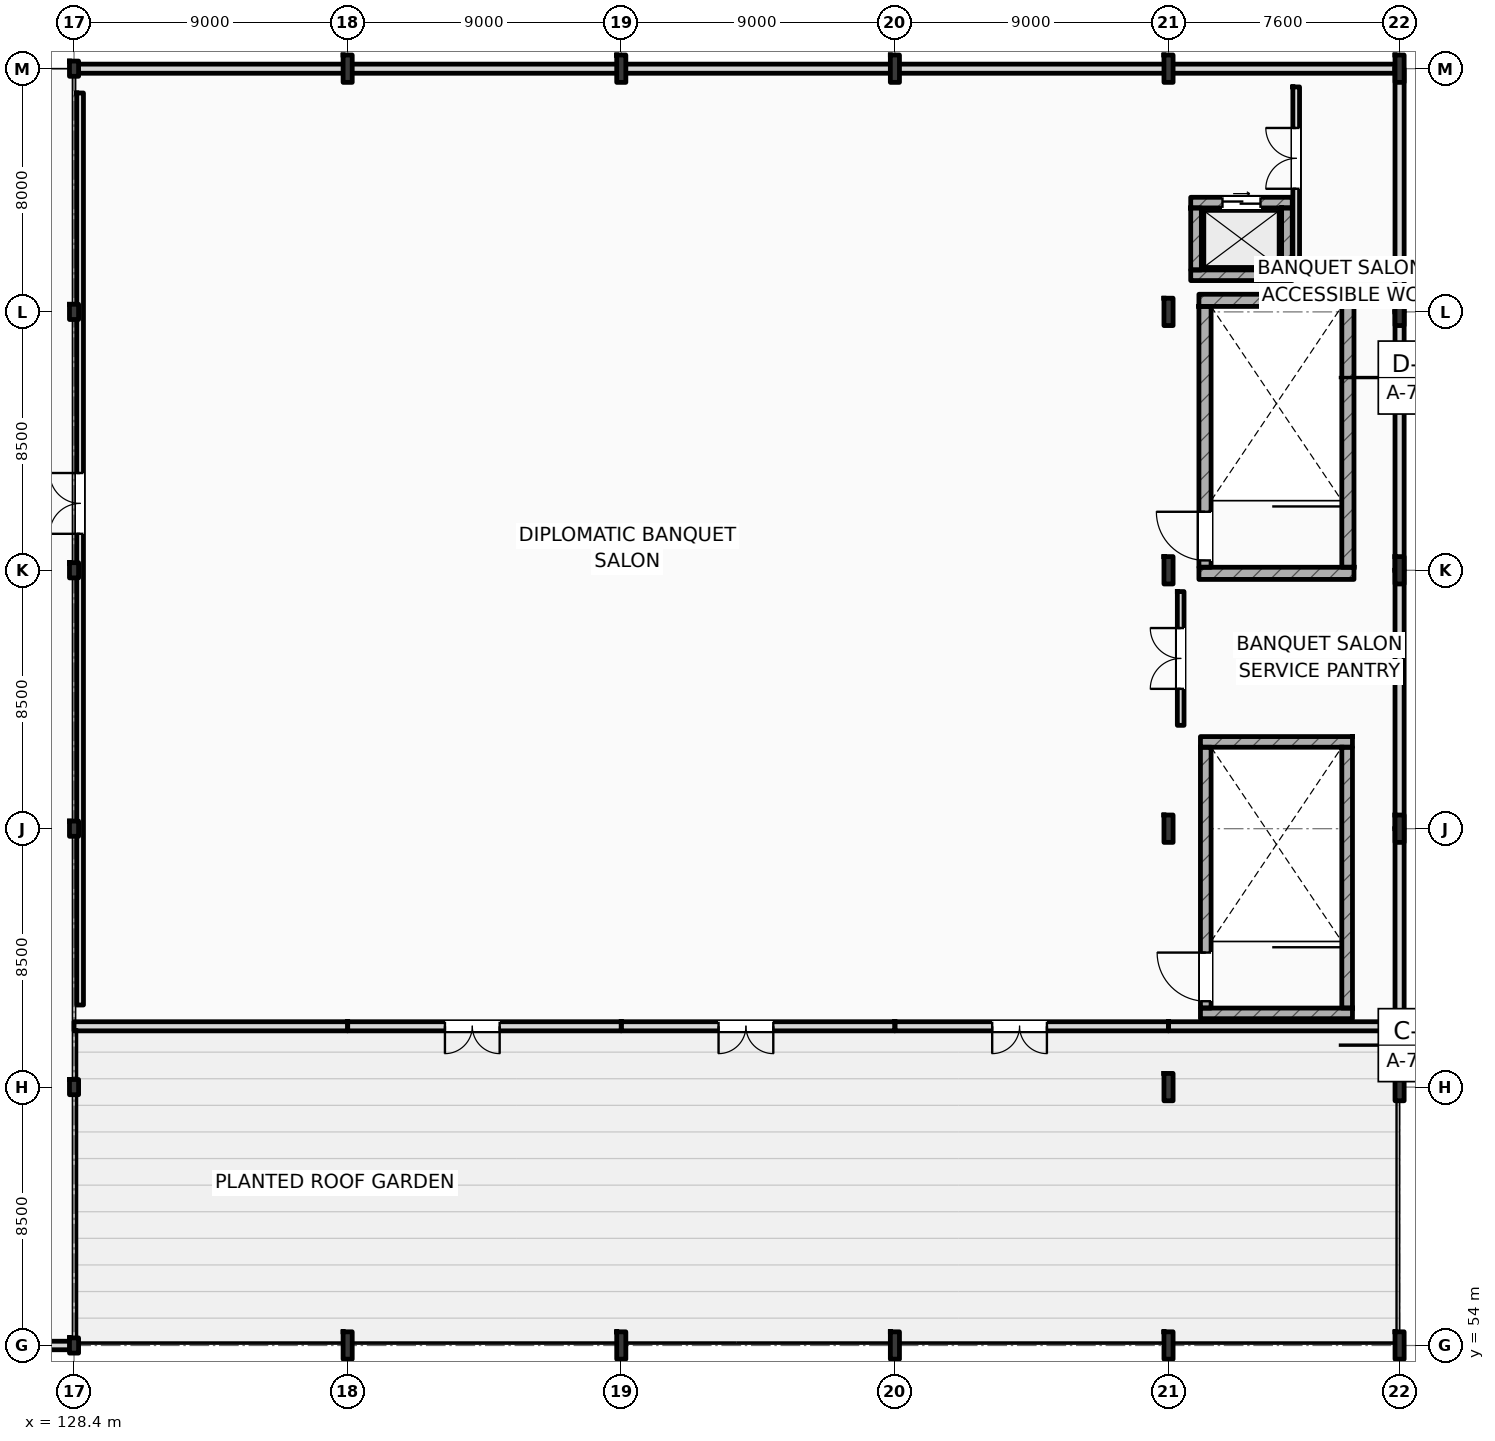
"""IFC4 building model, lengths in metres.
Left out: names, types, materials, properties, quantities, classifications, styles, units other than length and angle.
Written with IfcOpenShell. Run it as: python <this file> out.ifc"""

import sys

from ifc_helpers import new_model, si_unit, direction, frame, frame_2d, origin, origin_2d, place, context, subcontext, project, spatial, rectangle, i_section, extrude, element, fill, save


model = new_model("IFC4")
c1 = context("Model", 3, precision=1e-05, world=origin(), true_north=direction((0.0, 1.0)))
c2 = subcontext(c1, "Body", "Model", "MODEL_VIEW")
j1 = project(units=[si_unit("LENGTHUNIT", "METRE"), si_unit("PLANEANGLEUNIT", "RADIAN")], contexts=[c1])
p1 = place(None, origin())
s1 = spatial("IfcSite", under=j1, at=p1, CompositionType="ELEMENT")
p2 = place(p1, origin())
s2 = spatial("IfcBuilding", under=s1, at=p2, CompositionType="ELEMENT")
p3 = place(p2, frame((0.0, 0.0, 11.4)))
s3 = spatial("IfcBuildingStorey", under=s2, at=p3, CompositionType="ELEMENT", Elevation=11.4)
for number, where, z_axis, x_axis in (
    (1, (128.4, 54.0, 0.0), (0.0, 0.0, 1.0), (1.0, 0.0, 0.0)),
    (2, (128.4, 62.5, 0.0), (0.0, 0.0, 1.0), (1.0, 0.0, 0.0)),
    (3, (128.4, 71.0, 0.0), (0.0, 0.0, 1.0), (1.0, 0.0, 0.0)),
    (4, (128.4, 79.5, 0.0), (0.0, 0.0, 1.0), (1.0, 0.0, 0.0)),
    (5, (128.4, 88.0, 0.0), (0.0, 0.0, 1.0), (1.0, 0.0, 0.0)),
    (6, (128.4, 96.0, 0.0), (0.0, 0.0, 1.0), (1.0, 0.0, 0.0)),
):
    element("IfcColumn", number, at=place(p3, frame(where, z_axis=z_axis, x_axis=x_axis)), inside=s3, PredefinedType="COLUMN", context=c2, shape_type="SweptSolid", body=[
        extrude(i_section(OverallWidth=0.3, OverallDepth=0.5, WebThickness=0.014, FlangeThickness=0.028, FilletRadius=0.027, at=origin_2d()), origin(), (0.0, 0.0, 1.0), 4.8),
    ])
for number, where, z_axis, x_axis in (
    (7, (164.4, 54.0, 0.0), (0.0, 0.0, 1.0), (1.0, 0.0, 0.0)),
    (8, (164.4, 62.5, 0.0), (0.0, 0.0, 1.0), (1.0, 0.0, 0.0)),
    (9, (164.4, 71.0, 0.0), (0.0, 0.0, 1.0), (1.0, 0.0, 0.0)),
    (10, (164.4, 79.5, 0.0), (0.0, 0.0, 1.0), (1.0, 0.0, 0.0)),
    (11, (164.4, 88.0, 0.0), (0.0, 0.0, 1.0), (1.0, 0.0, 0.0)),
    (12, (164.4, 96.0, 0.0), (0.0, 0.0, 1.0), (1.0, 0.0, 0.0)),
    (13, (172.0, 54.0, 0.0), (0.0, 0.0, 1.0), (1.0, 0.0, 0.0)),
    (14, (172.0, 62.5, 0.0), (0.0, 0.0, 1.0), (1.0, 0.0, 0.0)),
    (15, (172.0, 71.0, 0.0), (0.0, 0.0, 1.0), (1.0, 0.0, 0.0)),
    (16, (172.0, 79.5, 0.0), (0.0, 0.0, 1.0), (1.0, 0.0, 0.0)),
    (17, (172.0, 88.0, 0.0), (0.0, 0.0, 1.0), (1.0, 0.0, 0.0)),
    (18, (172.0, 96.0, 0.0), (0.0, 0.0, 1.0), (1.0, 0.0, 0.0)),
    (19, (137.4, 54.0, 0.0), (0.0, 0.0, 1.0), (1.0, 0.0, 0.0)),
    (20, (137.4, 96.0, 0.0), (0.0, 0.0, 1.0), (1.0, 0.0, 0.0)),
    (21, (146.4, 54.0, 0.0), (0.0, 0.0, 1.0), (1.0, 0.0, 0.0)),
    (22, (146.4, 96.0, 0.0), (0.0, 0.0, 1.0), (1.0, 0.0, 0.0)),
    (23, (155.4, 54.0, 0.0), (0.0, 0.0, 1.0), (1.0, 0.0, 0.0)),
    (24, (155.4, 96.0, 0.0), (0.0, 0.0, 1.0), (1.0, 0.0, 0.0)),
):
    element("IfcColumn", number, at=place(p3, frame(where, z_axis=z_axis, x_axis=x_axis)), inside=s3, PredefinedType="COLUMN", context=c2, shape_type="SweptSolid", body=[
        extrude(i_section(OverallWidth=0.3, OverallDepth=0.9, WebThickness=0.019, FlangeThickness=0.035, FilletRadius=0.03, at=origin_2d()), origin(), (0.0, 0.0, 1.0), 4.8),
    ])
for number, where, z_axis, x_axis in (
    (25, (165.4, 88.38, 0.0), (0.0, 0.0, 1.0), (1.0, 0.0, 0.0)),
    (26, (165.4, 79.4, 0.0), (0.0, 0.0, 1.0), (1.0, 0.0, 0.0)),
):
    element("IfcWall", number, at=place(p3, frame(where, z_axis=z_axis, x_axis=x_axis)), inside=s3, PredefinedType="SHEAR", context=c2, shape_type="SweptSolid", body=[
        extrude(rectangle(XDim=5.1, YDim=0.4, at=frame_2d((2.55, 0.0))), origin(), (0.0, 0.0, 1.0), 4.8),
    ])
p4 = place(p3, frame((165.6, 79.6, 0.0), z_axis=(0.0, 0.0, 1.0), x_axis=(0.0, 1.0, 0.0)))
e27 = element("IfcWall", 27, at=p4, inside=s3, PredefinedType="SHEAR", context=c2, shape_type="SweptSolid", body=[
    extrude(rectangle(XDim=8.58, YDim=0.4, at=frame_2d((4.29, 0.0))), origin(), (0.0, 0.0, 1.0), 4.8),
])
p5 = place(p4, frame((0.225, 0.0, 0.0)))
e28 = element("IfcOpeningElement", 28, at=p5, cuts=e27, PredefinedType="OPENING", context=c2, shape_type="SweptSolid", body=[
    extrude(rectangle(XDim=1.6, YDim=2.2, at=frame_2d((0.8, 1.1))), frame((0.0, 0.21, 0.0), z_axis=(0.0, -1.0, 0.0), x_axis=(1.0, 0.0, 0.0)), (0.0, 0.0, 1.0), 0.42),
])
p6 = place(p3, frame((170.3, 79.6, 0.0), z_axis=(0.0, 0.0, 1.0), x_axis=(0.0, 1.0, 0.0)))
e29 = element("IfcWall", 29, at=p6, inside=s3, PredefinedType="SHEAR", context=c2, shape_type="SweptSolid", body=[
    extrude(rectangle(XDim=8.58, YDim=0.4, at=frame_2d((4.29, 0.0))), origin(), (0.0, 0.0, 1.0), 4.8),
])
for number, where, z_axis, x_axis in (
    (30, (165.45, 73.855, 0.0), (0.0, 0.0, 1.0), (1.0, 0.0, 0.0)),
    (31, (165.45, 64.925, 0.0), (0.0, 0.0, 1.0), (1.0, 0.0, 0.0)),
):
    element("IfcWall", number, at=place(p3, frame(where, z_axis=z_axis, x_axis=x_axis)), inside=s3, PredefinedType="SHEAR", context=c2, shape_type="SweptSolid", body=[
        extrude(rectangle(XDim=5.0, YDim=0.35, at=frame_2d((2.5, 0.0))), origin(), (0.0, 0.0, 1.0), 4.8),
    ])
p7 = place(p3, frame((165.625, 65.1, 0.0), z_axis=(0.0, 0.0, 1.0), x_axis=(0.0, 1.0, 0.0)))
e32 = element("IfcWall", 32, at=p7, inside=s3, PredefinedType="SHEAR", context=c2, shape_type="SweptSolid", body=[
    extrude(rectangle(XDim=8.58, YDim=0.35, at=frame_2d((4.29, 0.0))), origin(), (0.0, 0.0, 1.0), 4.8),
])
p8 = place(p7, frame((0.225, 0.0, 0.0)))
e33 = element("IfcOpeningElement", 33, at=p8, cuts=e32, PredefinedType="OPENING", context=c2, shape_type="SweptSolid", body=[
    extrude(rectangle(XDim=1.6, YDim=2.2, at=frame_2d((0.8, 1.1))), frame((0.0, 0.185, 0.0), z_axis=(0.0, -1.0, 0.0), x_axis=(1.0, 0.0, 0.0)), (0.0, 0.0, 1.0), 0.37),
])
p9 = place(p3, frame((170.275, 65.1, 0.0), z_axis=(0.0, 0.0, 1.0), x_axis=(0.0, 1.0, 0.0)))
e34 = element("IfcWall", 34, at=p9, inside=s3, PredefinedType="SHEAR", context=c2, shape_type="SweptSolid", body=[
    extrude(rectangle(XDim=8.58, YDim=0.35, at=frame_2d((4.29, 0.0))), origin(), (0.0, 0.0, 1.0), 4.8),
])
p10 = place(p3, frame((103.2, 54.0, 0.0), z_axis=(0.0, 0.0, 1.0), x_axis=(1.0, 0.0, 0.0)))
e35 = element("IfcWall", 35, at=p10, inside=s3, PredefinedType="STANDARD", context=c2, shape_type="SweptSolid", body=[
    extrude(rectangle(XDim=25.2, YDim=0.28, at=frame_2d((12.6, 0.0))), origin(), (0.0, 0.0, 1.0), 3.96),
])
p11 = place(p3, frame((128.4, 64.5, 0.0), z_axis=(0.0, 0.0, 1.0), x_axis=(1.0, 0.0, 0.0)))
e36 = element("IfcWall", 36, at=p11, inside=s3, PredefinedType="STANDARD", context=c2, shape_type="SweptSolid", body=[
    extrude(rectangle(XDim=9.0, YDim=0.3, at=frame_2d((4.5, 0.0))), origin(), (0.0, 0.0, 1.0), 4.54),
])
p12 = place(p3, frame((128.4, 96.0, 0.0), z_axis=(0.0, 0.0, 1.0), x_axis=(1.0, 0.0, 0.0)))
e37 = element("IfcWall", 37, at=p12, inside=s3, PredefinedType="STANDARD", context=c2, shape_type="SweptSolid", body=[
    extrude(rectangle(XDim=9.0, YDim=0.3, at=frame_2d((4.5, 0.0))), origin(), (0.0, 0.0, 1.0), 4.05),
])
p13 = place(p3, frame((137.4, 64.5, 0.0), z_axis=(0.0, 0.0, 1.0), x_axis=(1.0, 0.0, 0.0)))
e38 = element("IfcWall", 38, at=p13, inside=s3, PredefinedType="STANDARD", context=c2, shape_type="SweptSolid", body=[
    extrude(rectangle(XDim=9.0, YDim=0.3, at=frame_2d((4.5, 0.0))), origin(), (0.0, 0.0, 1.0), 4.54),
])
p14 = place(p13, frame((3.2, 0.0, 0.0)))
e39 = element("IfcOpeningElement", 39, at=p14, cuts=e38, PredefinedType="OPENING", context=c2, shape_type="SweptSolid", body=[
    extrude(rectangle(XDim=1.8, YDim=2.4, at=frame_2d((0.9, 1.2))), frame((0.0, 0.16, 0.0), z_axis=(0.0, -1.0, 0.0), x_axis=(1.0, 0.0, 0.0)), (0.0, 0.0, 1.0), 0.32),
])
p15 = place(p3, frame((137.4, 96.0, 0.0), z_axis=(0.0, 0.0, 1.0), x_axis=(1.0, 0.0, 0.0)))
e40 = element("IfcWall", 40, at=p15, inside=s3, PredefinedType="STANDARD", context=c2, shape_type="SweptSolid", body=[
    extrude(rectangle(XDim=9.0, YDim=0.3, at=frame_2d((4.5, 0.0))), origin(), (0.0, 0.0, 1.0), 4.05),
])
p16 = place(p3, frame((146.4, 64.5, 0.0), z_axis=(0.0, 0.0, 1.0), x_axis=(1.0, 0.0, 0.0)))
e41 = element("IfcWall", 41, at=p16, inside=s3, PredefinedType="STANDARD", context=c2, shape_type="SweptSolid", body=[
    extrude(rectangle(XDim=9.0, YDim=0.3, at=frame_2d((4.5, 0.0))), origin(), (0.0, 0.0, 1.0), 4.54),
])
p17 = place(p16, frame((3.2, 0.0, 0.0)))
e42 = element("IfcOpeningElement", 42, at=p17, cuts=e41, PredefinedType="OPENING", context=c2, shape_type="SweptSolid", body=[
    extrude(rectangle(XDim=1.8, YDim=2.4, at=frame_2d((0.9, 1.2))), frame((0.0, 0.16, 0.0), z_axis=(0.0, -1.0, 0.0), x_axis=(1.0, 0.0, 0.0)), (0.0, 0.0, 1.0), 0.32),
])
p18 = place(p3, frame((146.4, 96.0, 0.0), z_axis=(0.0, 0.0, 1.0), x_axis=(1.0, 0.0, 0.0)))
e43 = element("IfcWall", 43, at=p18, inside=s3, PredefinedType="STANDARD", context=c2, shape_type="SweptSolid", body=[
    extrude(rectangle(XDim=9.0, YDim=0.3, at=frame_2d((4.5, 0.0))), origin(), (0.0, 0.0, 1.0), 4.05),
])
p19 = place(p3, frame((155.4, 64.5, 0.0), z_axis=(0.0, 0.0, 1.0), x_axis=(1.0, 0.0, 0.0)))
e44 = element("IfcWall", 44, at=p19, inside=s3, PredefinedType="STANDARD", context=c2, shape_type="SweptSolid", body=[
    extrude(rectangle(XDim=9.0, YDim=0.3, at=frame_2d((4.5, 0.0))), origin(), (0.0, 0.0, 1.0), 4.54),
])
p20 = place(p19, frame((3.2, 0.0, 0.0)))
e45 = element("IfcOpeningElement", 45, at=p20, cuts=e44, PredefinedType="OPENING", context=c2, shape_type="SweptSolid", body=[
    extrude(rectangle(XDim=1.8, YDim=2.4, at=frame_2d((0.9, 1.2))), frame((0.0, 0.16, 0.0), z_axis=(0.0, -1.0, 0.0), x_axis=(1.0, 0.0, 0.0)), (0.0, 0.0, 1.0), 0.32),
])
p21 = place(p3, frame((155.4, 96.0, 0.0), z_axis=(0.0, 0.0, 1.0), x_axis=(1.0, 0.0, 0.0)))
e46 = element("IfcWall", 46, at=p21, inside=s3, PredefinedType="STANDARD", context=c2, shape_type="SweptSolid", body=[
    extrude(rectangle(XDim=9.0, YDim=0.3, at=frame_2d((4.5, 0.0))), origin(), (0.0, 0.0, 1.0), 4.05),
])
p22 = place(p3, frame((164.4, 64.5, 0.0), z_axis=(0.0, 0.0, 1.0), x_axis=(1.0, 0.0, 0.0)))
e47 = element("IfcWall", 47, at=p22, inside=s3, PredefinedType="STANDARD", context=c2, shape_type="SweptSolid", body=[
    extrude(rectangle(XDim=7.6, YDim=0.3, at=frame_2d((3.8, 0.0))), origin(), (0.0, 0.0, 1.0), 4.54),
])
p23 = place(p3, frame((164.4, 96.0, 0.0), z_axis=(0.0, 0.0, 1.0), x_axis=(1.0, 0.0, 0.0)))
e48 = element("IfcWall", 48, at=p23, inside=s3, PredefinedType="STANDARD", context=c2, shape_type="SweptSolid", body=[
    extrude(rectangle(XDim=7.6, YDim=0.3, at=frame_2d((3.8, 0.0))), origin(), (0.0, 0.0, 1.0), 4.2),
])
p24 = place(p3, frame((172.0, 64.5, 0.0), z_axis=(0.0, 0.0, 1.0), x_axis=(0.0, 1.0, 0.0)))
e49 = element("IfcWall", 49, at=p24, inside=s3, PredefinedType="STANDARD", context=c2, shape_type="SweptSolid", body=[
    extrude(rectangle(XDim=6.5, YDim=0.3, at=frame_2d((3.25, 0.0))), origin(), (0.0, 0.0, 1.0), 4.25),
])
for number, where, z_axis, x_axis in (
    (50, (172.0, 71.0, 0.0), (0.0, 0.0, 1.0), (0.0, 1.0, 0.0)),
    (51, (172.0, 79.5, 0.0), (0.0, 0.0, 1.0), (0.0, 1.0, 0.0)),
):
    element("IfcWall", number, at=place(p3, frame(where, z_axis=z_axis, x_axis=x_axis)), inside=s3, PredefinedType="STANDARD", context=c2, shape_type="SweptSolid", body=[
        extrude(rectangle(XDim=8.5, YDim=0.3, at=frame_2d((4.25, 0.0))), origin(), (0.0, 0.0, 1.0), 4.25),
    ])
p25 = place(p3, frame((172.0, 88.0, 0.0), z_axis=(0.0, 0.0, 1.0), x_axis=(0.0, 1.0, 0.0)))
e52 = element("IfcWall", 52, at=p25, inside=s3, PredefinedType="STANDARD", context=c2, shape_type="SweptSolid", body=[
    extrude(rectangle(XDim=8.0, YDim=0.3, at=frame_2d((4.0, 0.0))), origin(), (0.0, 0.0, 1.0), 4.25),
])
p26 = place(p3, frame((165.13, 91.595, 0.0), z_axis=(0.0, 0.0, 1.0), x_axis=(1.0, 0.0, 0.0)))
e53 = element("IfcWall", 53, at=p26, inside=s3, PredefinedType="SHEAR", context=c2, shape_type="SweptSolid", body=[
    extrude(rectangle(XDim=3.34, YDim=0.35, at=frame_2d((1.67, 0.0))), origin(), (0.0, 0.0, 1.0), 4.52),
])
p27 = place(p26, frame((1.045, 0.0, 0.0)))
e54 = element("IfcOpeningElement", 54, at=p27, cuts=e53, PredefinedType="OPENING", context=c2, shape_type="SweptSolid", body=[
    extrude(rectangle(XDim=1.25, YDim=2.25, at=frame_2d((0.625, 1.125))), frame((0.0, 0.185, 0.0), z_axis=(0.0, -1.0, 0.0), x_axis=(1.0, 0.0, 0.0)), (0.0, 0.0, 1.0), 0.37),
])
p28 = place(p3, frame((165.13, 89.205, 0.0), z_axis=(0.0, 0.0, 1.0), x_axis=(1.0, 0.0, 0.0)))
e55 = element("IfcWall", 55, at=p28, inside=s3, PredefinedType="SHEAR", context=c2, shape_type="SweptSolid", body=[
    extrude(rectangle(XDim=3.34, YDim=0.35, at=frame_2d((1.67, 0.0))), origin(), (0.0, 0.0, 1.0), 4.52),
])
for number, where, z_axis, x_axis in (
    (56, (165.305, 89.38, 0.0), (0.0, 0.0, 1.0), (0.0, 1.0, 0.0)),
    (57, (168.295, 89.38, 0.0), (0.0, 0.0, 1.0), (0.0, 1.0, 0.0)),
):
    element("IfcWall", number, at=place(p3, frame(where, z_axis=z_axis, x_axis=x_axis)), inside=s3, PredefinedType="SHEAR", context=c2, shape_type="SweptSolid", body=[
        extrude(rectangle(XDim=2.04, YDim=0.35, at=frame_2d((1.02, 0.0))), origin(), (0.0, 0.0, 1.0), 4.52),
    ])
p29 = place(p3, frame((128.6, 65.2, 0.0), z_axis=(0.0, 0.0, 1.0), x_axis=(0.0, 1.0, 0.0)))
e58 = element("IfcWall", 58, at=p29, inside=s3, PredefinedType="PARTITIONING", context=c2, shape_type="SweptSolid", body=[
    extrude(rectangle(XDim=30.0, YDim=0.22, at=frame_2d((15.0, 0.0))), origin(), (0.0, 0.0, 1.0), 4.11),
])
p30 = place(p29, frame((15.5, 0.0, 0.0)))
e59 = element("IfcOpeningElement", 59, at=p30, cuts=e58, PredefinedType="OPENING", context=c2, shape_type="SweptSolid", body=[
    extrude(rectangle(XDim=2.0, YDim=2.35, at=frame_2d((1.0, 1.175))), frame((0.0, 0.12, 0.0), z_axis=(0.0, -1.0, 0.0), x_axis=(1.0, 0.0, 0.0)), (0.0, 0.0, 1.0), 0.24),
])
p31 = place(p3, frame((164.8, 74.4, 0.0), z_axis=(0.0, 0.0, 1.0), x_axis=(0.0, 1.0, 0.0)))
e60 = element("IfcWall", 60, at=p31, inside=s3, PredefinedType="PARTITIONING", context=c2, shape_type="SweptSolid", body=[
    extrude(rectangle(XDim=4.4, YDim=0.22, at=frame_2d((2.2, 0.0))), origin(), (0.0, 0.0, 1.0), 4.52),
])
p32 = place(p31, frame((1.2, 0.0, 0.0)))
e61 = element("IfcOpeningElement", 61, at=p32, cuts=e60, PredefinedType="OPENING", context=c2, shape_type="SweptSolid", body=[
    extrude(rectangle(XDim=2.0, YDim=2.35, at=frame_2d((1.0, 1.175))), frame((0.0, 0.12, 0.0), z_axis=(0.0, -1.0, 0.0), x_axis=(1.0, 0.0, 0.0)), (0.0, 0.0, 1.0), 0.24),
])
p33 = place(p3, frame((168.6, 89.2, 0.0), z_axis=(0.0, 0.0, 1.0), x_axis=(0.0, 1.0, 0.0)))
e62 = element("IfcWall", 62, at=p33, inside=s3, PredefinedType="PARTITIONING", context=c2, shape_type="SweptSolid", body=[
    extrude(rectangle(XDim=6.2, YDim=0.22, at=frame_2d((3.1, 0.0))), origin(), (0.0, 0.0, 1.0), 4.52),
])
p34 = place(p33, frame((2.85, 0.0, 0.0)))
e63 = element("IfcOpeningElement", 63, at=p34, cuts=e62, PredefinedType="OPENING", context=c2, shape_type="SweptSolid", body=[
    extrude(rectangle(XDim=2.0, YDim=2.35, at=frame_2d((1.0, 1.175))), frame((0.0, 0.12, 0.0), z_axis=(0.0, -1.0, 0.0), x_axis=(1.0, 0.0, 0.0)), (0.0, 0.0, 1.0), 0.24),
])
p35 = place(p14, frame((1.8, 0.0, 0.0), z_axis=(0.0, 0.0, 1.0), x_axis=(-1.0, 0.0, 0.0)))
e64 = element("IfcDoor", 64, at=p35, inside=s3, OperationType="DOUBLE_SWING_LEFT", PredefinedType="DOOR", context=c2, shape_type="SweptSolid", body=[
    extrude(rectangle(XDim=1.8, YDim=2.4, at=frame_2d((0.9, 1.2))), frame((0.0, 0.025, 0.0), z_axis=(0.0, -1.0, 0.0), x_axis=(1.0, 0.0, 0.0)), (0.0, 0.0, 1.0), 0.05),
])
fill(e39, e64)
p36 = place(p17, frame((1.8, 0.0, 0.0), z_axis=(0.0, 0.0, 1.0), x_axis=(-1.0, 0.0, 0.0)))
e65 = element("IfcDoor", 65, at=p36, inside=s3, OperationType="DOUBLE_SWING_LEFT", PredefinedType="DOOR", context=c2, shape_type="SweptSolid", body=[
    extrude(rectangle(XDim=1.8, YDim=2.4, at=frame_2d((0.9, 1.2))), frame((0.0, 0.025, 0.0), z_axis=(0.0, -1.0, 0.0), x_axis=(1.0, 0.0, 0.0)), (0.0, 0.0, 1.0), 0.05),
])
fill(e42, e65)
p37 = place(p20, frame((1.8, 0.0, 0.0), z_axis=(0.0, 0.0, 1.0), x_axis=(-1.0, 0.0, 0.0)))
e66 = element("IfcDoor", 66, at=p37, inside=s3, OperationType="DOUBLE_SWING_LEFT", PredefinedType="DOOR", context=c2, shape_type="SweptSolid", body=[
    extrude(rectangle(XDim=1.8, YDim=2.4, at=frame_2d((0.9, 1.2))), frame((0.0, 0.025, 0.0), z_axis=(0.0, -1.0, 0.0), x_axis=(1.0, 0.0, 0.0)), (0.0, 0.0, 1.0), 0.05),
])
fill(e45, e66)
p38 = place(p5, origin())
e67 = element("IfcDoor", 67, at=p38, inside=s3, OperationType="SINGLE_SWING_RIGHT", PredefinedType="DOOR", context=c2, shape_type="SweptSolid", body=[
    extrude(rectangle(XDim=1.6, YDim=2.2, at=frame_2d((0.8, 1.1))), frame((0.0, 0.025, 0.0), z_axis=(0.0, -1.0, 0.0), x_axis=(1.0, 0.0, 0.0)), (0.0, 0.0, 1.0), 0.05),
])
fill(e28, e67)
p39 = place(p8, origin())
e68 = element("IfcDoor", 68, at=p39, inside=s3, OperationType="SINGLE_SWING_RIGHT", PredefinedType="DOOR", context=c2, shape_type="SweptSolid", body=[
    extrude(rectangle(XDim=1.6, YDim=2.2, at=frame_2d((0.8, 1.1))), frame((0.0, 0.025, 0.0), z_axis=(0.0, -1.0, 0.0), x_axis=(1.0, 0.0, 0.0)), (0.0, 0.0, 1.0), 0.05),
])
fill(e33, e68)
p40 = place(p27, origin())
e69 = element("IfcDoor", 69, at=p40, inside=s3, OperationType="SLIDING_TO_LEFT", PredefinedType="DOOR", context=c2, shape_type="SweptSolid", body=[
    extrude(rectangle(XDim=1.25, YDim=2.25, at=frame_2d((0.625, 1.125))), frame((0.0, 0.025, 0.0), z_axis=(0.0, -1.0, 0.0), x_axis=(1.0, 0.0, 0.0)), (0.0, 0.0, 1.0), 0.05),
])
fill(e54, e69)
p41 = place(p30, origin())
e70 = element("IfcDoor", 70, at=p41, inside=s3, OperationType="DOUBLE_SWING_LEFT", PredefinedType="DOOR", context=c2, shape_type="SweptSolid", body=[
    extrude(rectangle(XDim=2.0, YDim=2.35, at=frame_2d((1.0, 1.175))), frame((0.0, 0.025, 0.0), z_axis=(0.0, -1.0, 0.0), x_axis=(1.0, 0.0, 0.0)), (0.0, 0.0, 1.0), 0.05),
])
fill(e59, e70)
p42 = place(p32, origin())
e71 = element("IfcDoor", 71, at=p42, inside=s3, OperationType="DOUBLE_SWING_LEFT", PredefinedType="DOOR", context=c2, shape_type="SweptSolid", body=[
    extrude(rectangle(XDim=2.0, YDim=2.35, at=frame_2d((1.0, 1.175))), frame((0.0, 0.025, 0.0), z_axis=(0.0, -1.0, 0.0), x_axis=(1.0, 0.0, 0.0)), (0.0, 0.0, 1.0), 0.05),
])
fill(e61, e71)
p43 = place(p34, origin())
e72 = element("IfcDoor", 72, at=p43, inside=s3, OperationType="DOUBLE_SWING_LEFT", PredefinedType="DOOR", context=c2, shape_type="SweptSolid", body=[
    extrude(rectangle(XDim=2.0, YDim=2.35, at=frame_2d((1.0, 1.175))), frame((0.0, 0.025, 0.0), z_axis=(0.0, -1.0, 0.0), x_axis=(1.0, 0.0, 0.0)), (0.0, 0.0, 1.0), 0.05),
])
fill(e63, e72)
save(model, sys.argv[1])
